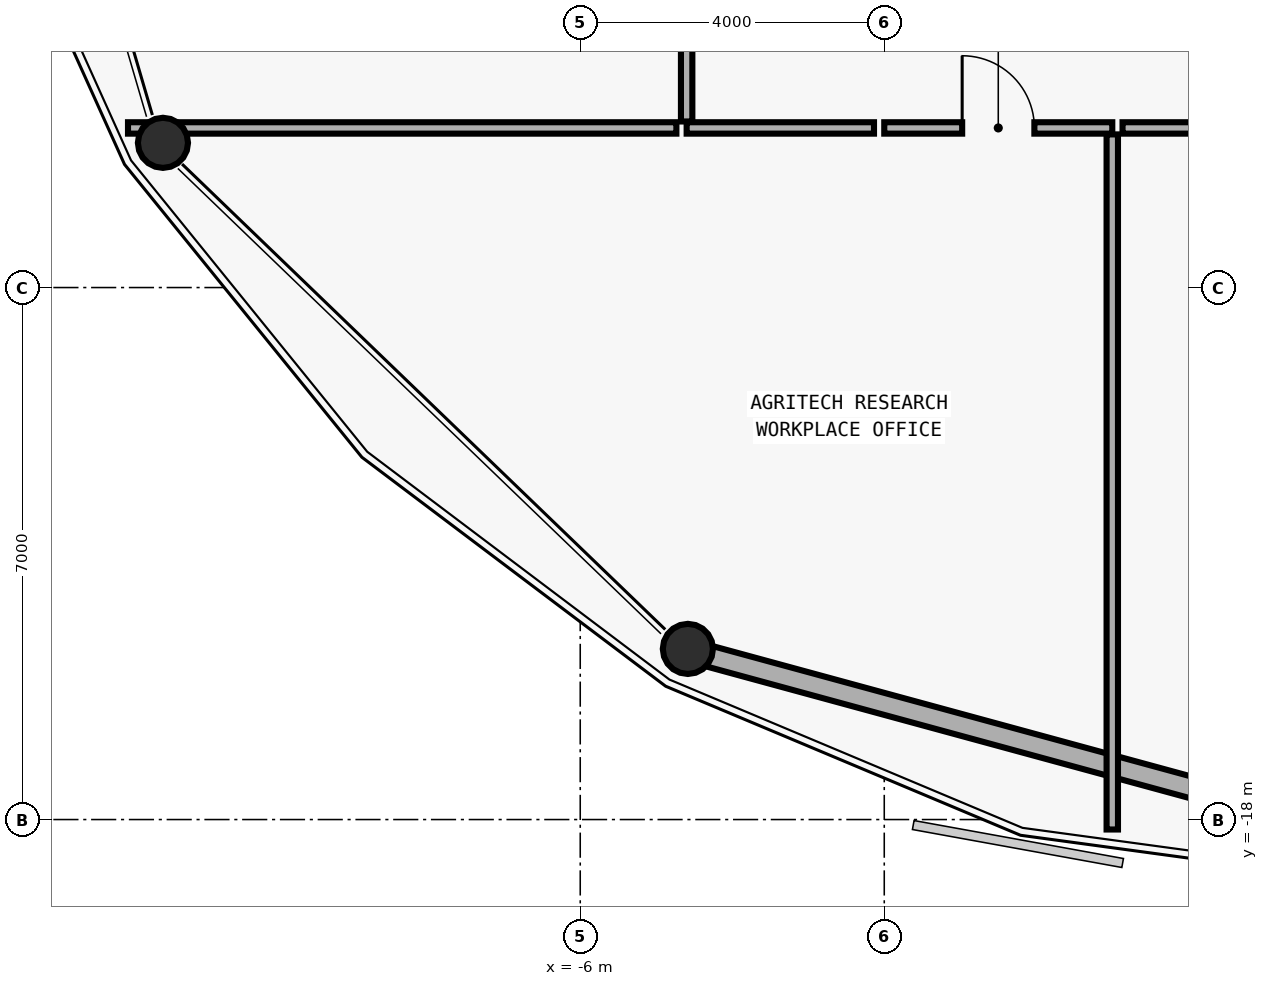
"""IFC4 building model, lengths in metres.
Left out: names, types, materials, properties, quantities, classifications, styles, units other than length and angle.
Written with IfcOpenShell. Run it as: python <this file> out.ifc"""

import sys

from ifc_helpers import new_model, si_unit, direction, frame, frame_2d, origin, origin_2d, place, context, subcontext, project, spatial, rectangle, hollow_circle, extrude, element, fill, save


model = new_model("IFC4")
c1 = context("Model", 3, precision=1e-05, world=origin(), true_north=direction((0.0, 1.0)))
c2 = subcontext(c1, "Body", "Model", "MODEL_VIEW")
j1 = project(units=[si_unit("LENGTHUNIT", "METRE"), si_unit("PLANEANGLEUNIT", "RADIAN")], contexts=[c1])
p1 = place(None, origin())
s1 = spatial("IfcSite", under=j1, at=p1, CompositionType="ELEMENT")
p2 = place(p1, origin())
s2 = spatial("IfcBuilding", under=s1, at=p2, CompositionType="ELEMENT")
p3 = place(p2, frame((0.0, 0.0, 218.4)))
s3 = spatial("IfcBuildingStorey", under=s2, at=p3, CompositionType="ELEMENT", Elevation=218.4)
p4 = place(p3, frame((-11.52, -9.104, 0.0), z_axis=(0.016454835979, 0.00477941294, 0.999853187015), x_axis=(-0.278928739366, 0.960311802674, 0.0)))
e1 = element("IfcColumn", 1, at=p4, inside=s3, PredefinedType="COLUMN", context=c2, shape_type="SweptSolid", body=[
    extrude(hollow_circle(Radius=0.33, WallThickness=0.025, at=origin_2d()), origin(), (0.0, 0.0, 1.0), 3.576),
])
p5 = place(p3, frame((-4.601, -15.77, 0.0), z_axis=(0.00955946629, 0.00826211015, 0.999920173884), x_axis=(-0.653901224294, 0.756579928935, 0.0)))
e2 = element("IfcColumn", 2, at=p5, inside=s3, PredefinedType="COLUMN", context=c2, shape_type="SweptSolid", body=[
    extrude(hollow_circle(Radius=0.33, WallThickness=0.025, at=origin_2d()), origin(), (0.0, 0.0, 1.0), 3.575),
])
p6 = place(p3, frame((4.575, -18.269, 0.0), z_axis=(0.0, 0.0, 1.0), x_axis=(-0.964845001115, 0.262819565145, 0.0)))
e3 = element("IfcWall", 3, at=p6, inside=s3, PredefinedType="SOLIDWALL", context=c2, shape_type="SweptSolid", body=[
    extrude(rectangle(XDim=9.225, YDim=0.28, at=frame_2d((4.613, 0.0))), origin(), (0.0, 0.0, 1.0), 2.93),
])
p7 = place(p3, frame((-2.0, -8.9, 0.0), z_axis=(0.0, 0.0, 1.0), x_axis=(1.0, 0.0, 0.0)))
e4 = element("IfcWall", 4, at=p7, inside=s3, PredefinedType="PARTITIONING", context=c2, shape_type="SweptSolid", body=[
    extrude(rectangle(XDim=3.0, YDim=0.15, at=frame_2d((1.5, 0.0))), origin(), (0.0, 0.0, 1.0), 3.36),
])
p8 = place(p7, frame((1.025, 0.0, 0.0)))
e5 = element("IfcOpeningElement", 5, at=p8, cuts=e4, PredefinedType="OPENING", context=c2, shape_type="SweptSolid", body=[
    extrude(rectangle(XDim=0.95, YDim=2.1, at=frame_2d((0.475, 1.05))), frame((0.0, 0.085, 0.0), z_axis=(0.0, -1.0, 0.0), x_axis=(1.0, 0.0, 0.0)), (0.0, 0.0, 1.0), 0.17),
])
p9 = place(p3, frame((1.135, -8.9, 0.0), z_axis=(0.0, 0.0, 1.0), x_axis=(1.0, 0.0, 0.0)))
e6 = element("IfcWall", 6, at=p9, inside=s3, PredefinedType="PARTITIONING", context=c2, shape_type="SweptSolid", body=[
    extrude(rectangle(XDim=6.865, YDim=0.15, at=frame_2d((3.433, 0.0))), origin(), (0.0, 0.0, 1.0), 3.36),
])
p10 = place(p9, frame((2.89, 0.0, 0.0)))
e7 = element("IfcOpeningElement", 7, at=p10, cuts=e6, PredefinedType="OPENING", context=c2, shape_type="SweptSolid", body=[
    extrude(rectangle(XDim=0.95, YDim=2.1, at=frame_2d((0.475, 1.05))), frame((0.0, 0.085, 0.0), z_axis=(0.0, -1.0, 0.0), x_axis=(1.0, 0.0, 0.0)), (0.0, 0.0, 1.0), 0.17),
])
p11 = place(p3, frame((-4.6, -8.9, 0.0), z_axis=(0.0, 0.0, 1.0), x_axis=(1.0, 0.0, 0.0)))
e8 = element("IfcWall", 8, at=p11, inside=s3, PredefinedType="PARTITIONING", context=c2, shape_type="SweptSolid", body=[
    extrude(rectangle(XDim=2.465, YDim=0.15, at=frame_2d((1.232, 0.0))), origin(), (0.0, 0.0, 1.0), 3.36),
])
p12 = place(p3, frame((1.0, -8.985, 0.0), z_axis=(0.0, 0.0, 1.0), x_axis=(0.0, -1.0, 0.0)))
e9 = element("IfcWall", 9, at=p12, inside=s3, PredefinedType="PARTITIONING", context=c2, shape_type="SweptSolid", body=[
    extrude(rectangle(XDim=9.146, YDim=0.15, at=frame_2d((4.573, 0.0))), origin(), (0.0, 0.0, 1.0), 3.36),
])
p13 = place(p3, frame((-11.95, -8.9, 0.0), z_axis=(0.0, 0.0, 1.0), x_axis=(1.0, 0.0, 0.0)))
e10 = element("IfcWall", 10, at=p13, inside=s3, PredefinedType="PARTITIONING", context=c2, shape_type="SweptSolid", body=[
    extrude(rectangle(XDim=7.215, YDim=0.15, at=frame_2d((3.607, 0.0))), origin(), (0.0, 0.0, 1.0), 2.842),
])
p14 = place(p3, frame((-4.6, -6.735, 0.0), z_axis=(0.0, 0.0, 1.0), x_axis=(0.0, -1.0, 0.0)))
e11 = element("IfcWall", 11, at=p14, inside=s3, PredefinedType="PARTITIONING", context=c2, shape_type="SweptSolid", body=[
    extrude(rectangle(XDim=2.08, YDim=0.15, at=frame_2d((1.04, 0.0))), origin(), (0.0, 0.0, 1.0), 3.36),
])
p15 = place(p8, origin())
e12 = element("IfcDoor", 12, at=p15, inside=s3, OperationType="SINGLE_SWING_LEFT", PredefinedType="DOOR", context=c2, shape_type="SweptSolid", body=[
    extrude(rectangle(XDim=0.95, YDim=2.1, at=frame_2d((0.475, 1.05))), frame((0.0, 0.025, 0.0), z_axis=(0.0, -1.0, 0.0), x_axis=(1.0, 0.0, 0.0)), (0.0, 0.0, 1.0), 0.05),
])
fill(e5, e12)
save(model, sys.argv[1])
